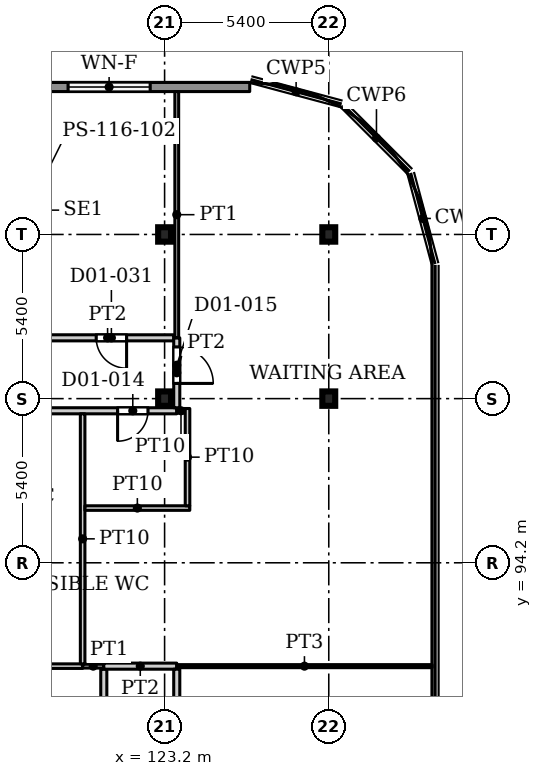
"""IFC4 building model, lengths in metres.
Left out: names, types, materials, properties, quantities, classifications, styles, units other than length and angle.
Written with IfcOpenShell. Run it as: python <this file> out.ifc"""

import sys

from ifc_helpers import new_model, si_unit, direction, frame, frame_2d, origin, origin_2d, place, context, subcontext, project, spatial, rectangle, i_section, extrude, source, transform, mapped, element, fill, save


model = new_model("IFC4")
c1 = context("Model", 3, precision=1e-05, world=origin(), true_north=direction((0.0, 1.0)))
c2 = subcontext(c1, "Body", "Model", "MODEL_VIEW")
j1 = project(units=[si_unit("LENGTHUNIT", "METRE"), si_unit("PLANEANGLEUNIT", "RADIAN")], contexts=[c1])
p1 = place(None, origin())
s1 = spatial("IfcSite", under=j1, at=p1, CompositionType="ELEMENT")
p2 = place(p1, origin())
s2 = spatial("IfcBuilding", under=s1, at=p2, CompositionType="ELEMENT")
p3 = place(p2, frame((0.0, 0.0, 7.5)))
s3 = spatial("IfcBuildingStorey", under=s2, at=p3, CompositionType="ELEMENT", Elevation=7.5)
for number, where, z_axis, x_axis in (
    (1, (123.2, 99.6, 0.0), (0.0, 0.0, 1.0), (1.0, 0.0, 0.0)),
    (2, (128.6, 99.6, 0.0), (0.0, 0.0, 1.0), (1.0, 0.0, 0.0)),
    (3, (123.2, 105.0, 0.0), (0.0, 0.0, 1.0), (1.0, 0.0, 0.0)),
    (4, (128.6, 105.0, 0.0), (0.0, 0.0, 1.0), (1.0, 0.0, 0.0)),
):
    element("IfcColumn", number, at=place(p3, frame(where, z_axis=z_axis, x_axis=x_axis)), inside=s3, PredefinedType="COLUMN", context=c2, shape_type="SweptSolid", body=[
        extrude(i_section(OverallWidth=0.424, OverallDepth=0.474, WebThickness=0.048, FlangeThickness=0.077, FilletRadius=0.014, at=origin_2d()), origin(), (0.0, 0.0, 1.0), 5.0),
    ])
p4 = place(p3, frame((78.48, 109.85, 0.0), z_axis=(0.0, 0.0, 1.0), x_axis=(1.0, 0.0, 0.0)))
e5 = element("IfcWall", 5, at=p4, inside=s3, PredefinedType="SOLIDWALL", context=c2, shape_type="SweptSolid", body=[
    extrude(rectangle(XDim=47.52, YDim=0.3, at=frame_2d((23.76, 0.0))), origin(), (0.0, 0.0, 1.0), 4.75),
])
p5 = place(p4, frame((1.045, 0.0, 0.6)))
e6 = element("IfcOpeningElement", 6, at=p5, cuts=e5, PredefinedType="OPENING", context=c2, shape_type="SweptSolid", body=[
    extrude(rectangle(XDim=2.7, YDim=3.0, at=frame_2d((1.35, 1.5))), frame((0.0, 0.16, 0.0), z_axis=(0.0, -1.0, 0.0), x_axis=(1.0, 0.0, 0.0)), (0.0, 0.0, 1.0), 0.32),
])
p6 = place(p4, frame((6.28, 0.0, 0.6)))
e7 = element("IfcOpeningElement", 7, at=p6, cuts=e5, PredefinedType="OPENING", context=c2, shape_type="SweptSolid", body=[
    extrude(rectangle(XDim=2.7, YDim=3.0, at=frame_2d((1.35, 1.5))), frame((0.0, 0.16, 0.0), z_axis=(0.0, -1.0, 0.0), x_axis=(1.0, 0.0, 0.0)), (0.0, 0.0, 1.0), 0.32),
])
p7 = place(p4, frame((15.765, 0.0, 0.6)))
e8 = element("IfcOpeningElement", 8, at=p7, cuts=e5, PredefinedType="OPENING", context=c2, shape_type="SweptSolid", body=[
    extrude(rectangle(XDim=2.7, YDim=3.0, at=frame_2d((1.35, 1.5))), frame((0.0, 0.16, 0.0), z_axis=(0.0, -1.0, 0.0), x_axis=(1.0, 0.0, 0.0)), (0.0, 0.0, 1.0), 0.32),
])
p8 = place(p4, frame((22.47, 0.0, 0.6)))
e9 = element("IfcOpeningElement", 9, at=p8, cuts=e5, PredefinedType="OPENING", context=c2, shape_type="SweptSolid", body=[
    extrude(rectangle(XDim=2.7, YDim=3.0, at=frame_2d((1.35, 1.5))), frame((0.0, 0.16, 0.0), z_axis=(0.0, -1.0, 0.0), x_axis=(1.0, 0.0, 0.0)), (0.0, 0.0, 1.0), 0.32),
])
p9 = place(p4, frame((30.99, 0.0, 0.6)))
e10 = element("IfcOpeningElement", 10, at=p9, cuts=e5, PredefinedType="OPENING", context=c2, shape_type="SweptSolid", body=[
    extrude(rectangle(XDim=2.7, YDim=3.0, at=frame_2d((1.35, 1.5))), frame((0.0, 0.16, 0.0), z_axis=(0.0, -1.0, 0.0), x_axis=(1.0, 0.0, 0.0)), (0.0, 0.0, 1.0), 0.32),
])
p10 = place(p4, frame((41.545, 0.0, 0.6)))
e11 = element("IfcOpeningElement", 11, at=p10, cuts=e5, PredefinedType="OPENING", context=c2, shape_type="SweptSolid", body=[
    extrude(rectangle(XDim=2.7, YDim=3.0, at=frame_2d((1.35, 1.5))), frame((0.0, 0.16, 0.0), z_axis=(0.0, -1.0, 0.0), x_axis=(1.0, 0.0, 0.0)), (0.0, 0.0, 1.0), 0.32),
])
p11 = place(p3, frame((56.1, 99.2, 0.0), z_axis=(0.0, 0.0, 1.0), x_axis=(1.0, 0.0, 0.0)))
e12 = element("IfcWall", 12, at=p11, inside=s3, PredefinedType="PARTITIONING", context=c2, shape_type="SweptSolid", body=[
    extrude(rectangle(XDim=67.5, YDim=0.2, at=frame_2d((33.75, 0.0))), origin(), (0.0, 0.0, 1.0), 4.68),
])
p12 = place(p11, frame((4.05, 0.0, 0.0)))
e13 = element("IfcOpeningElement", 13, at=p12, cuts=e12, PredefinedType="OPENING", context=c2, shape_type="SweptSolid", body=[
    extrude(rectangle(XDim=1.0, YDim=2.1, at=frame_2d((0.5, 1.05))), frame((0.0, 0.11, 0.0), z_axis=(0.0, -1.0, 0.0), x_axis=(1.0, 0.0, 0.0)), (0.0, 0.0, 1.0), 0.22),
])
p13 = place(p11, frame((65.554, 0.0, 0.0)))
e14 = element("IfcOpeningElement", 14, at=p13, cuts=e12, PredefinedType="OPENING", context=c2, shape_type="SweptSolid", body=[
    extrude(rectangle(XDim=1.0, YDim=2.1, at=frame_2d((0.5, 1.05))), frame((0.0, 0.11, 0.0), z_axis=(0.0, -1.0, 0.0), x_axis=(1.0, 0.0, 0.0)), (0.0, 0.0, 1.0), 0.22),
])
p14 = place(p11, frame((11.589, 0.0, 0.0)))
e15 = element("IfcOpeningElement", 15, at=p14, cuts=e12, PredefinedType="OPENING", context=c2, shape_type="SweptSolid", body=[
    extrude(rectangle(XDim=1.0, YDim=2.1, at=frame_2d((0.5, 1.05))), frame((0.0, 0.11, 0.0), z_axis=(0.0, -1.0, 0.0), x_axis=(1.0, 0.0, 0.0)), (0.0, 0.0, 1.0), 0.22),
])
p15 = place(p11, frame((20.329, 0.0, 0.0)))
e16 = element("IfcOpeningElement", 16, at=p15, cuts=e12, PredefinedType="OPENING", context=c2, shape_type="SweptSolid", body=[
    extrude(rectangle(XDim=1.0, YDim=2.1, at=frame_2d((0.5, 1.05))), frame((0.0, 0.11, 0.0), z_axis=(0.0, -1.0, 0.0), x_axis=(1.0, 0.0, 0.0)), (0.0, 0.0, 1.0), 0.22),
])
p16 = place(p11, frame((27.319, 0.0, 0.0)))
e17 = element("IfcOpeningElement", 17, at=p16, cuts=e12, PredefinedType="OPENING", context=c2, shape_type="SweptSolid", body=[
    extrude(rectangle(XDim=1.0, YDim=2.1, at=frame_2d((0.5, 1.05))), frame((0.0, 0.11, 0.0), z_axis=(0.0, -1.0, 0.0), x_axis=(1.0, 0.0, 0.0)), (0.0, 0.0, 1.0), 0.22),
])
p17 = place(p11, frame((33.262, 0.0, 0.0)))
e18 = element("IfcOpeningElement", 18, at=p17, cuts=e12, PredefinedType="OPENING", context=c2, shape_type="SweptSolid", body=[
    extrude(rectangle(XDim=1.0, YDim=2.1, at=frame_2d((0.5, 1.05))), frame((0.0, 0.11, 0.0), z_axis=(0.0, -1.0, 0.0), x_axis=(1.0, 0.0, 0.0)), (0.0, 0.0, 1.0), 0.22),
])
p18 = place(p11, frame((42.002, 0.0, 0.0)))
e19 = element("IfcOpeningElement", 19, at=p18, cuts=e12, PredefinedType="OPENING", context=c2, shape_type="SweptSolid", body=[
    extrude(rectangle(XDim=1.0, YDim=2.1, at=frame_2d((0.5, 1.05))), frame((0.0, 0.11, 0.0), z_axis=(0.0, -1.0, 0.0), x_axis=(1.0, 0.0, 0.0)), (0.0, 0.0, 1.0), 0.22),
])
p19 = place(p11, frame((49.743, 0.0, 0.0)))
e20 = element("IfcOpeningElement", 20, at=p19, cuts=e12, PredefinedType="OPENING", context=c2, shape_type="SweptSolid", body=[
    extrude(rectangle(XDim=1.0, YDim=2.1, at=frame_2d((0.5, 1.05))), frame((0.0, 0.11, 0.0), z_axis=(0.0, -1.0, 0.0), x_axis=(1.0, 0.0, 0.0)), (0.0, 0.0, 1.0), 0.22),
])
p20 = place(p11, frame((56.733, 0.0, 0.0)))
e21 = element("IfcOpeningElement", 21, at=p20, cuts=e12, PredefinedType="OPENING", context=c2, shape_type="SweptSolid", body=[
    extrude(rectangle(XDim=1.0, YDim=2.1, at=frame_2d((0.5, 1.05))), frame((0.0, 0.11, 0.0), z_axis=(0.0, -1.0, 0.0), x_axis=(1.0, 0.0, 0.0)), (0.0, 0.0, 1.0), 0.22),
])
p21 = place(p11, frame((61.394, 0.0, 0.0)))
e22 = element("IfcOpeningElement", 22, at=p21, cuts=e12, PredefinedType="OPENING", context=c2, shape_type="SweptSolid", body=[
    extrude(rectangle(XDim=1.0, YDim=2.1, at=frame_2d((0.5, 1.05))), frame((0.0, 0.11, 0.0), z_axis=(0.0, -1.0, 0.0), x_axis=(1.0, 0.0, 0.0)), (0.0, 0.0, 1.0), 0.22),
])
p22 = place(p3, frame((110.183, 90.8, 0.0), z_axis=(0.0, 0.0, 1.0), x_axis=(1.0, 0.0, 0.0)))
e23 = element("IfcWall", 23, at=p22, inside=s3, PredefinedType="PARTITIONING", context=c2, shape_type="SweptSolid", body=[
    extrude(rectangle(XDim=10.321, YDim=0.15, at=frame_2d((5.16, 0.0))), origin(), (0.0, 0.0, 1.0), 4.68),
])
p23 = place(p3, frame((119.15, 101.6, 0.0), z_axis=(0.0, 0.0, 1.0), x_axis=(1.0, 0.0, 0.0)))
e24 = element("IfcWall", 24, at=p23, inside=s3, PredefinedType="PARTITIONING", context=c2, shape_type="SweptSolid", body=[
    extrude(rectangle(XDim=4.35, YDim=0.2, at=frame_2d((2.175, 0.0))), origin(), (0.0, 0.0, 1.0), 4.68),
])
p24 = place(p23, frame((1.8, 0.0, 0.0)))
e25 = element("IfcOpeningElement", 25, at=p24, cuts=e24, PredefinedType="OPENING", context=c2, shape_type="SweptSolid", body=[
    extrude(rectangle(XDim=1.0, YDim=2.1, at=frame_2d((0.5, 1.05))), frame((0.0, 0.11, 0.0), z_axis=(0.0, -1.0, 0.0), x_axis=(1.0, 0.0, 0.0)), (0.0, 0.0, 1.0), 0.22),
])
p25 = place(p3, frame((120.504, 90.8, 0.0), z_axis=(0.0, 0.0, 1.0), x_axis=(1.0, 0.0, 0.0)))
e26 = element("IfcWall", 26, at=p25, inside=s3, PredefinedType="PARTITIONING", context=c2, shape_type="SweptSolid", body=[
    extrude(rectangle(XDim=0.696, YDim=0.125, at=frame_2d((0.348, 0.0))), origin(), (0.0, 0.0, 1.0), 4.68),
])
p26 = place(p3, frame((120.504, 90.875, 0.0), z_axis=(0.0, 0.0, 1.0), x_axis=(0.0, 1.0, 0.0)))
e27 = element("IfcWall", 27, at=p26, inside=s3, PredefinedType="PARTITIONING", context=c2, shape_type="SweptSolid", body=[
    extrude(rectangle(XDim=8.225, YDim=0.15, at=frame_2d((4.113, 0.0))), origin(), (0.0, 0.0, 1.0), 4.68),
])
p27 = place(p3, frame((120.579, 96.0, 0.0), z_axis=(0.0, 0.0, 1.0), x_axis=(1.0, 0.0, 0.0)))
e28 = element("IfcWall", 28, at=p27, inside=s3, PredefinedType="PARTITIONING", context=c2, shape_type="SweptSolid", body=[
    extrude(rectangle(XDim=3.45, YDim=0.15, at=frame_2d((1.725, 0.0))), origin(), (0.0, 0.0, 1.0), 4.68),
])
p28 = place(p3, frame((121.2, 74.6, 0.0), z_axis=(0.0, 0.0, 1.0), x_axis=(0.0, 1.0, 0.0)))
e29 = element("IfcWall", 29, at=p28, inside=s3, PredefinedType="PARTITIONING", context=c2, shape_type="SweptSolid", body=[
    extrude(rectangle(XDim=16.1, YDim=0.2, at=frame_2d((8.05, 0.0))), origin(), (0.0, 0.0, 1.0), 4.68),
])
p29 = place(p28, frame((3.987, 0.0, 0.0)))
e30 = element("IfcOpeningElement", 30, at=p29, cuts=e29, PredefinedType="OPENING", context=c2, shape_type="SweptSolid", body=[
    extrude(rectangle(XDim=1.0, YDim=2.1, at=frame_2d((0.5, 1.05))), frame((0.0, 0.11, 0.0), z_axis=(0.0, -1.0, 0.0), x_axis=(1.0, 0.0, 0.0)), (0.0, 0.0, 1.0), 0.22),
])
p30 = place(p28, frame((12.05, 0.0, 0.0)))
e31 = element("IfcOpeningElement", 31, at=p30, cuts=e29, PredefinedType="OPENING", context=c2, shape_type="SweptSolid", body=[
    extrude(rectangle(XDim=1.0, YDim=2.1, at=frame_2d((0.5, 1.05))), frame((0.0, 0.11, 0.0), z_axis=(0.0, -1.0, 0.0), x_axis=(1.0, 0.0, 0.0)), (0.0, 0.0, 1.0), 0.22),
])
p31 = place(p3, frame((121.2, 90.8, 0.0), z_axis=(0.0, 0.0, 1.0), x_axis=(1.0, 0.0, 0.0)))
e32 = element("IfcWall", 32, at=p31, inside=s3, PredefinedType="PARTITIONING", context=c2, shape_type="SweptSolid", body=[
    extrude(rectangle(XDim=2.4, YDim=0.2, at=frame_2d((1.2, 0.0))), origin(), (0.0, 0.0, 1.0), 4.68),
])
p32 = place(p3, frame((123.6, 69.15, 0.0), z_axis=(0.0, 0.0, 1.0), x_axis=(0.0, 1.0, 0.0)))
e33 = element("IfcWall", 33, at=p32, inside=s3, PredefinedType="PARTITIONING", context=c2, shape_type="SweptSolid", body=[
    extrude(rectangle(XDim=21.55, YDim=0.2, at=frame_2d((10.775, 0.0))), origin(), (0.0, 0.0, 1.0), 4.68),
])
p33 = place(p32, frame((4.4, 0.0, 0.0)))
e34 = element("IfcOpeningElement", 34, at=p33, cuts=e33, PredefinedType="OPENING", context=c2, shape_type="SweptSolid", body=[
    extrude(rectangle(XDim=1.0, YDim=2.1, at=frame_2d((0.5, 1.05))), frame((0.0, 0.11, 0.0), z_axis=(0.0, -1.0, 0.0), x_axis=(1.0, 0.0, 0.0)), (0.0, 0.0, 1.0), 0.22),
])
p34 = place(p32, frame((15.238, 0.0, 0.0)))
e35 = element("IfcOpeningElement", 35, at=p34, cuts=e33, PredefinedType="OPENING", context=c2, shape_type="SweptSolid", body=[
    extrude(rectangle(XDim=1.0, YDim=2.1, at=frame_2d((0.5, 1.05))), frame((0.0, 0.11, 0.0), z_axis=(0.0, -1.0, 0.0), x_axis=(1.0, 0.0, 0.0)), (0.0, 0.0, 1.0), 0.22),
])
p35 = place(p32, frame((11.238, 0.0, 0.0)))
e36 = element("IfcOpeningElement", 36, at=p35, cuts=e33, PredefinedType="OPENING", context=c2, shape_type="SweptSolid", body=[
    extrude(rectangle(XDim=1.2, YDim=2.1, at=frame_2d((0.6, 1.05))), frame((0.0, 0.11, 0.0), z_axis=(0.0, -1.0, 0.0), x_axis=(1.0, 0.0, 0.0)), (0.0, 0.0, 1.0), 0.22),
])
p36 = place(p3, frame((123.6, 90.8, 0.0), z_axis=(0.0, 0.0, 1.0), x_axis=(1.0, 0.0, 0.0)))
e37 = element("IfcWall", 37, at=p36, inside=s3, PredefinedType="PARTITIONING", context=c2, shape_type="SweptSolid", body=[
    extrude(rectangle(XDim=8.4, YDim=0.1, at=frame_2d((4.2, 0.0))), origin(), (0.0, 0.0, 1.0), 4.68),
])
p37 = place(p3, frame((123.6, 99.2, 0.0), z_axis=(0.0, 0.0, 1.0), x_axis=(1.0, 0.0, 0.0)))
e38 = element("IfcWall", 38, at=p37, inside=s3, PredefinedType="PARTITIONING", context=c2, shape_type="SweptSolid", body=[
    extrude(rectangle(XDim=0.279, YDim=0.15, at=frame_2d((0.139, 0.0))), origin(), (0.0, 0.0, 1.0), 4.68),
])
p38 = place(p3, frame((123.6, 99.3, 0.0), z_axis=(0.0, 0.0, 1.0), x_axis=(0.0, 1.0, 0.0)))
e39 = element("IfcWall", 39, at=p38, inside=s3, PredefinedType="PARTITIONING", context=c2, shape_type="SweptSolid", body=[
    extrude(rectangle(XDim=2.3, YDim=0.2, at=frame_2d((1.15, 0.0))), origin(), (0.0, 0.0, 1.0), 4.68),
])
p39 = place(p38, frame((0.8, 0.0, 0.0)))
e40 = element("IfcOpeningElement", 40, at=p39, cuts=e39, PredefinedType="OPENING", context=c2, shape_type="SweptSolid", body=[
    extrude(rectangle(XDim=1.2, YDim=2.1, at=frame_2d((0.6, 1.05))), frame((0.0, 0.11, 0.0), z_axis=(0.0, -1.0, 0.0), x_axis=(1.0, 0.0, 0.0)), (0.0, 0.0, 1.0), 0.22),
])
p40 = place(p3, frame((123.6, 101.6, 0.0), z_axis=(0.0, 0.0, 1.0), x_axis=(0.0, 1.0, 0.0)))
e41 = element("IfcWall", 41, at=p40, inside=s3, PredefinedType="PARTITIONING", context=c2, shape_type="SweptSolid", body=[
    extrude(rectangle(XDim=8.101, YDim=0.125, at=frame_2d((4.05, 0.0))), origin(), (0.0, 0.0, 1.0), 4.68),
])
p41 = place(p3, frame((123.954, 96.075, 0.0), z_axis=(0.0, 0.0, 1.0), x_axis=(0.0, 1.0, 0.0)))
e42 = element("IfcWall", 42, at=p41, inside=s3, PredefinedType="PARTITIONING", context=c2, shape_type="SweptSolid", body=[
    extrude(rectangle(XDim=3.2, YDim=0.15, at=frame_2d((1.6, 0.0))), origin(), (0.0, 0.0, 1.0), 4.68),
])
m1 = source(origin(), c2, "Body", "SweptSolid", [
    extrude(rectangle(XDim=2.7, YDim=3.0, at=frame_2d((1.35, 1.5))), frame((0.0, 0.03, 0.0), z_axis=(0.0, -1.0, 0.0), x_axis=(1.0, 0.0, 0.0)), (0.0, 0.0, 1.0), 0.06),
])
p42 = place(p10, origin())
e43 = element("IfcWindow", 43, at=p42, inside=s3, PartitioningType="SINGLE_PANEL", PredefinedType="WINDOW", context=c2, shape_type="MappedRepresentation", body=[
    mapped(m1, transform((0.0, 0.0, 0.0), x_axis=(1.0, 0.0, 0.0), y_axis=(0.0, 1.0, 0.0), z_axis=(0.0, 0.0, 1.0), scale=1.0)),
])
fill(e11, e43)
m2 = source(origin(), c2, "Body", "SweptSolid", [
    extrude(rectangle(XDim=1.0, YDim=2.1, at=frame_2d((0.5, 1.05))), frame((0.0, 0.025, 0.0), z_axis=(0.0, -1.0, 0.0), x_axis=(1.0, 0.0, 0.0)), (0.0, 0.0, 1.0), 0.05),
])
p43 = place(p13, origin())
e44 = element("IfcDoor", 44, at=p43, inside=s3, OperationType="SINGLE_SWING_RIGHT", PredefinedType="DOOR", context=c2, shape_type="MappedRepresentation", body=[
    mapped(m2, transform((0.0, 0.0, 0.0), x_axis=(1.0, 0.0, 0.0), y_axis=(0.0, 1.0, 0.0), z_axis=(0.0, 0.0, 1.0), scale=1.0)),
])
fill(e14, e44)
m3 = source(origin(), c2, "Body", "SweptSolid", [
    extrude(rectangle(XDim=1.2, YDim=2.1, at=frame_2d((0.6, 1.05))), frame((0.0, 0.025, 0.0), z_axis=(0.0, -1.0, 0.0), x_axis=(1.0, 0.0, 0.0)), (0.0, 0.0, 1.0), 0.05),
])
p44 = place(p39, origin())
e45 = element("IfcDoor", 45, at=p44, inside=s3, OperationType="SINGLE_SWING_RIGHT", PredefinedType="DOOR", context=c2, shape_type="MappedRepresentation", body=[
    mapped(m3, transform((0.0, 0.0, 0.0), x_axis=(1.0, 0.0, 0.0), y_axis=(0.0, 1.0, 0.0), z_axis=(0.0, 0.0, 1.0), scale=1.0)),
])
fill(e40, e45)
p45 = place(p24, origin())
e46 = element("IfcDoor", 46, at=p45, inside=s3, OperationType="SINGLE_SWING_RIGHT", PredefinedType="DOOR", context=c2, shape_type="MappedRepresentation", body=[
    mapped(m2, transform((0.0, 0.0, 0.0), x_axis=(1.0, 0.0, 0.0), y_axis=(0.0, 1.0, 0.0), z_axis=(0.0, 0.0, 1.0), scale=1.0)),
])
fill(e25, e46)
save(model, sys.argv[1])
